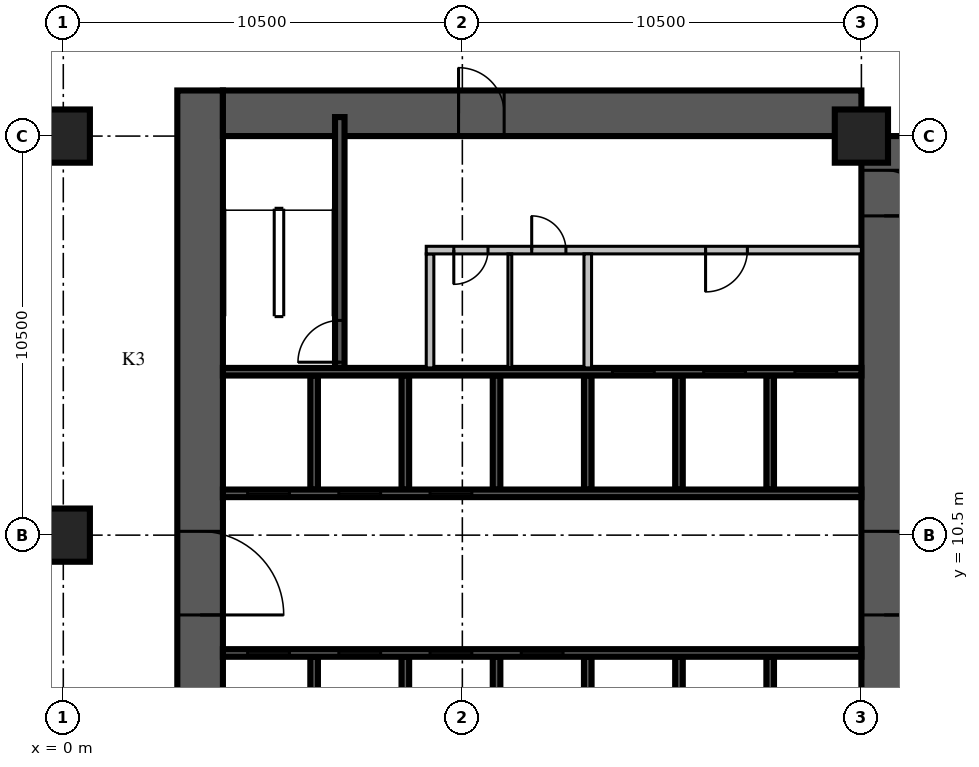
"""IFC4 building model, lengths in metres.
Left out: names, types, materials, properties, quantities, classifications, styles, units other than length and angle.
Written with IfcOpenShell. Run it as: python <this file> out.ifc"""

import sys

from ifc_helpers import new_model, si_unit, direction, frame, frame_2d, origin, origin_2d, place, context, subcontext, project, spatial, rectangle, extrude, source, transform, mapped, element, fill, save


model = new_model("IFC4")
c1 = context("Model", 3, precision=1e-05, world=origin(), true_north=direction((0.0, 1.0)))
c2 = subcontext(c1, "Body", "Model", "MODEL_VIEW")
j1 = project(units=[si_unit("LENGTHUNIT", "METRE"), si_unit("PLANEANGLEUNIT", "RADIAN")], contexts=[c1])
p1 = place(None, origin())
s1 = spatial("IfcSite", under=j1, at=p1, CompositionType="ELEMENT")
p2 = place(p1, origin())
s2 = spatial("IfcBuilding", under=s1, at=p2, CompositionType="ELEMENT")
p3 = place(p2, frame((0.0, 0.0, -13.5)))
s3 = spatial("IfcBuildingStorey", under=s2, at=p3, CompositionType="ELEMENT", Elevation=-13.5)
m1 = source(origin(), c2, "Body", "SweptSolid", [
    extrude(rectangle(XDim=1.4, YDim=1.4, at=origin_2d()), origin(), (0.0, 0.0, 1.0), 4.5),
])
for number, where, z_axis, x_axis in (
    (1, (0.0, 10.5, 0.0), (0.0, 0.0, 1.0), (1.0, 0.0, 0.0)),
    (2, (0.0, 21.0, 0.0), (0.0, 0.0, 1.0), (1.0, 0.0, 0.0)),
    (3, (21.0, 21.0, 0.0), (0.0, 0.0, 1.0), (1.0, 0.0, 0.0)),
):
    element("IfcColumn", number, at=place(p3, frame(where, z_axis=z_axis, x_axis=x_axis)), inside=s3, PredefinedType="COLUMN", context=c2, shape_type="MappedRepresentation", body=[
        mapped(m1, transform((0.0, 0.0, 0.0), scale=1.0)),
    ])
p4 = place(p3, frame((3.6, 4.2, 0.0), z_axis=(0.0, 0.0, 1.0), x_axis=(0.0, 1.0, 0.0)))
e4 = element("IfcWall", 4, at=p4, inside=s3, PredefinedType="SHEAR", context=c2, shape_type="SweptSolid", body=[
    extrude(rectangle(XDim=18.0, YDim=1.2, at=frame_2d((9.0, 0.0))), origin(), (0.0, 0.0, 1.0), 4.5),
])
m2 = source(origin(), c2, "Body", "SweptSolid", [
    extrude(rectangle(XDim=2.2, YDim=2.1, at=frame_2d((1.1, 1.05))), frame((0.0, 0.61, 0.0), z_axis=(0.0, -1.0, 0.0), x_axis=(1.0, 0.0, 0.0)), (0.0, 0.0, 1.0), 1.22),
])
p5 = place(p4, frame((4.2, 0.0, 0.0)))
e5 = element("IfcOpeningElement", 5, at=p5, cuts=e4, PredefinedType="OPENING", context=c2, shape_type="MappedRepresentation", body=[
    mapped(m2, transform((0.0, 0.0, 0.0), scale=1.0)),
])
p6 = place(p3, frame((21.6, 4.2, 0.0), z_axis=(0.0, 0.0, 1.0), x_axis=(0.0, 1.0, 0.0)))
e6 = element("IfcWall", 6, at=p6, inside=s3, PredefinedType="SHEAR", context=c2, shape_type="SweptSolid", body=[
    extrude(rectangle(XDim=16.8, YDim=1.2, at=frame_2d((8.4, 0.0))), origin(), (0.0, 0.0, 1.0), 4.5),
])
p7 = place(p6, frame((4.2, 0.0, 0.0)))
e7 = element("IfcOpeningElement", 7, at=p7, cuts=e6, PredefinedType="OPENING", context=c2, shape_type="SweptSolid", body=[
    extrude(rectangle(XDim=2.2, YDim=2.1, at=frame_2d((1.1, 1.05))), frame((0.0, 0.61, 0.0), z_axis=(0.0, -1.0, 0.0), x_axis=(1.0, 0.0, 0.0)), (0.0, 0.0, 1.0), 1.22),
])
m3 = source(origin(), c2, "Body", "SweptSolid", [
    extrude(rectangle(XDim=1.2, YDim=2.1, at=frame_2d((0.6, 1.05))), frame((0.0, 0.61, 0.0), z_axis=(0.0, -1.0, 0.0), x_axis=(1.0, 0.0, 0.0)), (0.0, 0.0, 1.0), 1.22),
])
p8 = place(p6, frame((14.7, 0.0, 0.0)))
e8 = element("IfcOpeningElement", 8, at=p8, cuts=e6, PredefinedType="OPENING", context=c2, shape_type="MappedRepresentation", body=[
    mapped(m3, transform((0.0, 0.0, 0.0), scale=1.0)),
])
m4 = source(origin(), c2, "Body", "SweptSolid", [
    extrude(rectangle(XDim=16.8, YDim=1.2, at=frame_2d((8.4, 0.0))), origin(), (0.0, 0.0, 1.0), 4.5),
])
p9 = place(p3, frame((4.2, 21.6, 0.0), z_axis=(0.0, 0.0, 1.0), x_axis=(1.0, 0.0, 0.0)))
e9 = element("IfcWall", 9, at=p9, inside=s3, PredefinedType="SHEAR", context=c2, shape_type="MappedRepresentation", body=[
    mapped(m4, transform((0.0, 0.0, 0.0), scale=1.0)),
])
p10 = place(p9, frame((6.2, 0.0, 0.0)))
e10 = element("IfcOpeningElement", 10, at=p10, cuts=e9, PredefinedType="OPENING", context=c2, shape_type="SweptSolid", body=[
    extrude(rectangle(XDim=1.2, YDim=2.1, at=frame_2d((0.6, 1.05))), frame((0.0, 0.61, 0.0), z_axis=(0.0, -1.0, 0.0), x_axis=(1.0, 0.0, 0.0)), (0.0, 0.0, 1.0), 1.22),
])
p11 = place(p3, frame((6.6, 4.2, 0.0), z_axis=(0.0, 0.0, 1.0), x_axis=(0.0, 1.0, 0.0)))
e11 = element("IfcWall", 11, at=p11, inside=s3, PredefinedType="SOLIDWALL", context=c2, shape_type="SweptSolid", body=[
    extrude(rectangle(XDim=3.1, YDim=0.2, at=frame_2d((1.55, 0.0))), origin(), (0.0, 0.0, 1.0), 4.5),
])
m5 = source(origin(), c2, "Body", "SweptSolid", [
    extrude(rectangle(XDim=3.1, YDim=0.2, at=frame_2d((1.55, 0.0))), origin(), (0.0, 0.0, 1.0), 4.5),
])
for number, where, z_axis, x_axis in (
    (12, (9.0, 4.2, 0.0), (0.0, 0.0, 1.0), (0.0, 1.0, 0.0)),
    (13, (11.4, 4.2, 0.0), (0.0, 0.0, 1.0), (0.0, 1.0, 0.0)),
    (14, (13.8, 4.2, 0.0), (0.0, 0.0, 1.0), (0.0, 1.0, 0.0)),
    (15, (16.2, 4.2, 0.0), (0.0, 0.0, 1.0), (0.0, 1.0, 0.0)),
    (16, (18.6, 4.2, 0.0), (0.0, 0.0, 1.0), (0.0, 1.0, 0.0)),
):
    element("IfcWall", number, at=place(p3, frame(where, z_axis=z_axis, x_axis=x_axis)), inside=s3, PredefinedType="SOLIDWALL", context=c2, shape_type="MappedRepresentation", body=[
        mapped(m5, transform((0.0, 0.0, 0.0), scale=1.0)),
    ])
p12 = place(p3, frame((6.6, 11.7, 0.0), z_axis=(0.0, 0.0, 1.0), x_axis=(0.0, 1.0, 0.0)))
e17 = element("IfcWall", 17, at=p12, inside=s3, PredefinedType="SOLIDWALL", context=c2, shape_type="SweptSolid", body=[
    extrude(rectangle(XDim=3.0, YDim=0.2, at=frame_2d((1.5, 0.0))), origin(), (0.0, 0.0, 1.0), 4.5),
])
m6 = source(origin(), c2, "Body", "SweptSolid", [
    extrude(rectangle(XDim=3.0, YDim=0.2, at=frame_2d((1.5, 0.0))), origin(), (0.0, 0.0, 1.0), 4.5),
])
for number, where, z_axis, x_axis in (
    (18, (9.0, 11.7, 0.0), (0.0, 0.0, 1.0), (0.0, 1.0, 0.0)),
    (19, (11.4, 11.7, 0.0), (0.0, 0.0, 1.0), (0.0, 1.0, 0.0)),
    (20, (13.8, 11.7, 0.0), (0.0, 0.0, 1.0), (0.0, 1.0, 0.0)),
    (21, (16.2, 11.7, 0.0), (0.0, 0.0, 1.0), (0.0, 1.0, 0.0)),
    (22, (18.6, 11.7, 0.0), (0.0, 0.0, 1.0), (0.0, 1.0, 0.0)),
):
    element("IfcWall", number, at=place(p3, frame(where, z_axis=z_axis, x_axis=x_axis)), inside=s3, PredefinedType="SOLIDWALL", context=c2, shape_type="MappedRepresentation", body=[
        mapped(m6, transform((0.0, 0.0, 0.0), scale=1.0)),
    ])
p13 = place(p3, frame((4.2, 7.4, 0.0), z_axis=(0.0, 0.0, 1.0), x_axis=(1.0, 0.0, 0.0)))
e23 = element("IfcWall", 23, at=p13, inside=s3, PredefinedType="SOLIDWALL", context=c2, shape_type="SweptSolid", body=[
    extrude(rectangle(XDim=16.8, YDim=0.2, at=frame_2d((8.4, 0.0))), origin(), (0.0, 0.0, 1.0), 4.5),
])
p14 = place(p13, frame((0.65, 0.0, 0.0)))
e24 = element("IfcOpeningElement", 24, at=p14, cuts=e23, PredefinedType="OPENING", context=c2, shape_type="SweptSolid", body=[
    extrude(rectangle(XDim=1.1, YDim=2.1, at=frame_2d((0.55, 1.05))), frame((0.0, 0.11, 0.0), z_axis=(0.0, -1.0, 0.0), x_axis=(1.0, 0.0, 0.0)), (0.0, 0.0, 1.0), 0.22),
])
m7 = source(origin(), c2, "Body", "SweptSolid", [
    extrude(rectangle(XDim=1.1, YDim=2.1, at=frame_2d((0.55, 1.05))), frame((0.0, 0.11, 0.0), z_axis=(0.0, -1.0, 0.0), x_axis=(1.0, 0.0, 0.0)), (0.0, 0.0, 1.0), 0.22),
])
p15 = place(p13, frame((3.05, 0.0, 0.0)))
e25 = element("IfcOpeningElement", 25, at=p15, cuts=e23, PredefinedType="OPENING", context=c2, shape_type="MappedRepresentation", body=[
    mapped(m7, transform((0.0, 0.0, 0.0), scale=1.0)),
])
p16 = place(p13, frame((5.45, 0.0, 0.0)))
e26 = element("IfcOpeningElement", 26, at=p16, cuts=e23, PredefinedType="OPENING", context=c2, shape_type="MappedRepresentation", body=[
    mapped(m7, transform((0.0, 0.0, 0.0), scale=1.0)),
])
p17 = place(p13, frame((7.85, 0.0, 0.0)))
e27 = element("IfcOpeningElement", 27, at=p17, cuts=e23, PredefinedType="OPENING", context=c2, shape_type="MappedRepresentation", body=[
    mapped(m7, transform((0.0, 0.0, 0.0), scale=1.0)),
])
m8 = source(origin(), c2, "Body", "SweptSolid", [
    extrude(rectangle(XDim=16.8, YDim=0.2, at=frame_2d((8.4, 0.0))), origin(), (0.0, 0.0, 1.0), 4.5),
])
p18 = place(p3, frame((4.2, 11.6, 0.0), z_axis=(0.0, 0.0, 1.0), x_axis=(1.0, 0.0, 0.0)))
e28 = element("IfcWall", 28, at=p18, inside=s3, PredefinedType="SOLIDWALL", context=c2, shape_type="MappedRepresentation", body=[
    mapped(m8, transform((0.0, 0.0, 0.0), scale=1.0)),
])
p19 = place(p18, frame((0.65, 0.0, 0.0)))
e29 = element("IfcOpeningElement", 29, at=p19, cuts=e28, PredefinedType="OPENING", context=c2, shape_type="MappedRepresentation", body=[
    mapped(m7, transform((0.0, 0.0, 0.0), scale=1.0)),
])
p20 = place(p18, frame((3.05, 0.0, 0.0)))
e30 = element("IfcOpeningElement", 30, at=p20, cuts=e28, PredefinedType="OPENING", context=c2, shape_type="MappedRepresentation", body=[
    mapped(m7, transform((0.0, 0.0, 0.0), scale=1.0)),
])
p21 = place(p18, frame((5.45, 0.0, 0.0)))
e31 = element("IfcOpeningElement", 31, at=p21, cuts=e28, PredefinedType="OPENING", context=c2, shape_type="MappedRepresentation", body=[
    mapped(m7, transform((0.0, 0.0, 0.0), scale=1.0)),
])
p22 = place(p3, frame((4.2, 14.8, 0.0), z_axis=(0.0, 0.0, 1.0), x_axis=(1.0, 0.0, 0.0)))
e32 = element("IfcWall", 32, at=p22, inside=s3, PredefinedType="SOLIDWALL", context=c2, shape_type="MappedRepresentation", body=[
    mapped(m8, transform((0.0, 0.0, 0.0), scale=1.0)),
])
p23 = place(p22, frame((10.25, 0.0, 0.0)))
e33 = element("IfcOpeningElement", 33, at=p23, cuts=e32, PredefinedType="OPENING", context=c2, shape_type="MappedRepresentation", body=[
    mapped(m7, transform((0.0, 0.0, 0.0), scale=1.0)),
])
p24 = place(p22, frame((12.65, 0.0, 0.0)))
e34 = element("IfcOpeningElement", 34, at=p24, cuts=e32, PredefinedType="OPENING", context=c2, shape_type="MappedRepresentation", body=[
    mapped(m7, transform((0.0, 0.0, 0.0), scale=1.0)),
])
p25 = place(p22, frame((15.05, 0.0, 0.0)))
e35 = element("IfcOpeningElement", 35, at=p25, cuts=e32, PredefinedType="OPENING", context=c2, shape_type="MappedRepresentation", body=[
    mapped(m7, transform((0.0, 0.0, 0.0), scale=1.0)),
])
p26 = place(p3, frame((7.275, 14.9, 0.0), z_axis=(0.0, 0.0, 1.0), x_axis=(0.0, 1.0, 0.0)))
e36 = element("IfcWall", 36, at=p26, inside=s3, PredefinedType="SOLIDWALL", context=c2, shape_type="SweptSolid", body=[
    extrude(rectangle(XDim=6.6, YDim=0.25, at=frame_2d((3.3, 0.0))), origin(), (0.0, 0.0, 1.0), 3.9),
])
p27 = place(p26, frame((0.15, 0.0, 0.0)))
e37 = element("IfcOpeningElement", 37, at=p27, cuts=e36, PredefinedType="OPENING", context=c2, shape_type="SweptSolid", body=[
    extrude(rectangle(XDim=1.1, YDim=2.1, at=frame_2d((0.55, 1.05))), frame((0.0, 0.135, 0.0), z_axis=(0.0, -1.0, 0.0), x_axis=(1.0, 0.0, 0.0)), (0.0, 0.0, 1.0), 0.27),
])
p28 = place(p3, frame((9.65, 14.9, 0.0), z_axis=(0.0, 0.0, 1.0), x_axis=(0.0, 1.0, 0.0)))
e38 = element("IfcWall", 38, at=p28, inside=s3, PredefinedType="PARTITIONING", context=c2, shape_type="SweptSolid", body=[
    extrude(rectangle(XDim=3.0, YDim=0.2, at=frame_2d((1.5, 0.0))), origin(), (0.0, 0.0, 1.0), 3.9),
])
p29 = place(p3, frame((9.55, 18.0, 0.0), z_axis=(0.0, 0.0, 1.0), x_axis=(1.0, 0.0, 0.0)))
e39 = element("IfcWall", 39, at=p29, inside=s3, PredefinedType="PARTITIONING", context=c2, shape_type="SweptSolid", body=[
    extrude(rectangle(XDim=11.45, YDim=0.2, at=frame_2d((5.725, 0.0))), origin(), (0.0, 0.0, 1.0), 3.9),
])
p30 = place(p29, frame((0.725, 0.0, 0.0)))
e40 = element("IfcOpeningElement", 40, at=p30, cuts=e39, PredefinedType="OPENING", context=c2, shape_type="SweptSolid", body=[
    extrude(rectangle(XDim=0.9, YDim=2.1, at=frame_2d((0.45, 1.05))), frame((0.0, 0.11, 0.0), z_axis=(0.0, -1.0, 0.0), x_axis=(1.0, 0.0, 0.0)), (0.0, 0.0, 1.0), 0.22),
])
m9 = source(origin(), c2, "Body", "SweptSolid", [
    extrude(rectangle(XDim=0.9, YDim=2.1, at=frame_2d((0.45, 1.05))), frame((0.0, 0.11, 0.0), z_axis=(0.0, -1.0, 0.0), x_axis=(1.0, 0.0, 0.0)), (0.0, 0.0, 1.0), 0.22),
])
p31 = place(p29, frame((2.775, 0.0, 0.0)))
e41 = element("IfcOpeningElement", 41, at=p31, cuts=e39, PredefinedType="OPENING", context=c2, shape_type="MappedRepresentation", body=[
    mapped(m9, transform((0.0, 0.0, 0.0), scale=1.0)),
])
p32 = place(p29, frame((7.35, 0.0, 0.0)))
e42 = element("IfcOpeningElement", 42, at=p32, cuts=e39, PredefinedType="OPENING", context=c2, shape_type="MappedRepresentation", body=[
    mapped(m7, transform((0.0, 0.0, 0.0), scale=1.0)),
])
m10 = source(origin(), c2, "Body", "SweptSolid", [
    extrude(rectangle(XDim=3.0, YDim=0.2, at=frame_2d((1.5, 0.0))), origin(), (0.0, 0.0, 1.0), 3.9),
])
p33 = place(p3, frame((13.8, 14.9, 0.0), z_axis=(0.0, 0.0, 1.0), x_axis=(0.0, 1.0, 0.0)))
e43 = element("IfcWall", 43, at=p33, inside=s3, PredefinedType="PARTITIONING", context=c2, shape_type="MappedRepresentation", body=[
    mapped(m10, transform((0.0, 0.0, 0.0), scale=1.0)),
])
p34 = place(p3, frame((11.75, 14.9, 0.0), z_axis=(0.0, 0.0, 1.0), x_axis=(0.0, 1.0, 0.0)))
e44 = element("IfcWall", 44, at=p34, inside=s3, PredefinedType="PARTITIONING", context=c2, shape_type="SweptSolid", body=[
    extrude(rectangle(XDim=3.0, YDim=0.1, at=frame_2d((1.5, 0.0))), origin(), (0.0, 0.0, 1.0), 3.9),
])
p35 = place(p14, origin())
e45 = element("IfcDoor", 45, at=p35, inside=s3, OperationType="SLIDING_TO_LEFT", PredefinedType="DOOR", context=c2, shape_type="SweptSolid", body=[
    extrude(rectangle(XDim=1.1, YDim=2.1, at=frame_2d((0.55, 1.05))), frame((0.0, 0.025, 0.0), z_axis=(0.0, -1.0, 0.0), x_axis=(1.0, 0.0, 0.0)), (0.0, 0.0, 1.0), 0.05),
])
fill(e24, e45)
m11 = source(origin(), c2, "Body", "SweptSolid", [
    extrude(rectangle(XDim=1.1, YDim=2.1, at=frame_2d((0.55, 1.05))), frame((0.0, 0.025, 0.0), z_axis=(0.0, -1.0, 0.0), x_axis=(1.0, 0.0, 0.0)), (0.0, 0.0, 1.0), 0.05),
])
p36 = place(p15, origin())
e46 = element("IfcDoor", 46, at=p36, inside=s3, OperationType="SLIDING_TO_LEFT", PredefinedType="DOOR", context=c2, shape_type="MappedRepresentation", body=[
    mapped(m11, transform((0.0, 0.0, 0.0), scale=1.0)),
])
fill(e25, e46)
p37 = place(p16, origin())
e47 = element("IfcDoor", 47, at=p37, inside=s3, OperationType="SLIDING_TO_LEFT", PredefinedType="DOOR", context=c2, shape_type="MappedRepresentation", body=[
    mapped(m11, transform((0.0, 0.0, 0.0), scale=1.0)),
])
fill(e26, e47)
p38 = place(p17, origin())
e48 = element("IfcDoor", 48, at=p38, inside=s3, OperationType="SLIDING_TO_LEFT", PredefinedType="DOOR", context=c2, shape_type="MappedRepresentation", body=[
    mapped(m11, transform((0.0, 0.0, 0.0), scale=1.0)),
])
fill(e27, e48)
p39 = place(p19, origin())
e49 = element("IfcDoor", 49, at=p39, inside=s3, OperationType="SLIDING_TO_LEFT", PredefinedType="DOOR", context=c2, shape_type="MappedRepresentation", body=[
    mapped(m11, transform((0.0, 0.0, 0.0), scale=1.0)),
])
fill(e29, e49)
p40 = place(p20, origin())
e50 = element("IfcDoor", 50, at=p40, inside=s3, OperationType="SLIDING_TO_LEFT", PredefinedType="DOOR", context=c2, shape_type="MappedRepresentation", body=[
    mapped(m11, transform((0.0, 0.0, 0.0), scale=1.0)),
])
fill(e30, e50)
p41 = place(p21, origin())
e51 = element("IfcDoor", 51, at=p41, inside=s3, OperationType="SLIDING_TO_LEFT", PredefinedType="DOOR", context=c2, shape_type="MappedRepresentation", body=[
    mapped(m11, transform((0.0, 0.0, 0.0), scale=1.0)),
])
fill(e31, e51)
p42 = place(p23, origin())
e52 = element("IfcDoor", 52, at=p42, inside=s3, OperationType="SLIDING_TO_LEFT", PredefinedType="DOOR", context=c2, shape_type="MappedRepresentation", body=[
    mapped(m11, transform((0.0, 0.0, 0.0), scale=1.0)),
])
fill(e33, e52)
p43 = place(p24, origin())
e53 = element("IfcDoor", 53, at=p43, inside=s3, OperationType="SLIDING_TO_LEFT", PredefinedType="DOOR", context=c2, shape_type="MappedRepresentation", body=[
    mapped(m11, transform((0.0, 0.0, 0.0), scale=1.0)),
])
fill(e34, e53)
p44 = place(p25, origin())
e54 = element("IfcDoor", 54, at=p44, inside=s3, OperationType="SLIDING_TO_LEFT", PredefinedType="DOOR", context=c2, shape_type="MappedRepresentation", body=[
    mapped(m11, transform((0.0, 0.0, 0.0), scale=1.0)),
])
fill(e35, e54)
p45 = place(p27, origin())
e55 = element("IfcDoor", 55, at=p45, inside=s3, OperationType="SINGLE_SWING_LEFT", PredefinedType="DOOR", context=c2, shape_type="MappedRepresentation", body=[
    mapped(m11, transform((0.0, 0.0, 0.0), scale=1.0)),
])
fill(e37, e55)
m12 = source(origin(), c2, "Body", "SweptSolid", [
    extrude(rectangle(XDim=0.9, YDim=2.1, at=frame_2d((0.45, 1.05))), frame((0.0, 0.025, 0.0), z_axis=(0.0, -1.0, 0.0), x_axis=(1.0, 0.0, 0.0)), (0.0, 0.0, 1.0), 0.05),
])
p46 = place(p30, origin())
e56 = element("IfcDoor", 56, at=p46, inside=s3, OperationType="SINGLE_SWING_RIGHT", PredefinedType="DOOR", context=c2, shape_type="MappedRepresentation", body=[
    mapped(m12, transform((0.0, 0.0, 0.0), scale=1.0)),
])
fill(e40, e56)
p47 = place(p31, origin())
e57 = element("IfcDoor", 57, at=p47, inside=s3, OperationType="SINGLE_SWING_LEFT", PredefinedType="DOOR", context=c2, shape_type="MappedRepresentation", body=[
    mapped(m12, transform((0.0, 0.0, 0.0), scale=1.0)),
])
fill(e41, e57)
p48 = place(p32, origin())
e58 = element("IfcDoor", 58, at=p48, inside=s3, OperationType="SINGLE_SWING_RIGHT", PredefinedType="DOOR", context=c2, shape_type="MappedRepresentation", body=[
    mapped(m11, transform((0.0, 0.0, 0.0), scale=1.0)),
])
fill(e42, e58)
p49 = place(p7, origin())
e59 = element("IfcDoor", 59, at=p49, inside=s3, OperationType="DOUBLE_DOOR_SINGLE_SWING", PredefinedType="DOOR", context=c2, shape_type="SweptSolid", body=[
    extrude(rectangle(XDim=2.2, YDim=2.1, at=frame_2d((1.1, 1.05))), frame((0.0, 0.025, 0.0), z_axis=(0.0, -1.0, 0.0), x_axis=(1.0, 0.0, 0.0)), (0.0, 0.0, 1.0), 0.05),
])
fill(e7, e59)
m13 = source(origin(), c2, "Body", "SweptSolid", [
    extrude(rectangle(XDim=2.2, YDim=2.1, at=frame_2d((1.1, 1.05))), frame((0.0, 0.025, 0.0), z_axis=(0.0, -1.0, 0.0), x_axis=(1.0, 0.0, 0.0)), (0.0, 0.0, 1.0), 0.05),
])
p50 = place(p5, origin())
e60 = element("IfcDoor", 60, at=p50, inside=s3, OperationType="DOUBLE_DOOR_SINGLE_SWING", PredefinedType="DOOR", context=c2, shape_type="MappedRepresentation", body=[
    mapped(m13, transform((0.0, 0.0, 0.0), scale=1.0)),
])
fill(e5, e60)
m14 = source(origin(), c2, "Body", "SweptSolid", [
    extrude(rectangle(XDim=1.2, YDim=2.1, at=frame_2d((0.6, 1.05))), frame((0.0, 0.025, 0.0), z_axis=(0.0, -1.0, 0.0), x_axis=(1.0, 0.0, 0.0)), (0.0, 0.0, 1.0), 0.05),
])
p51 = place(p10, origin())
e61 = element("IfcDoor", 61, at=p51, inside=s3, OperationType="SINGLE_SWING_LEFT", PredefinedType="DOOR", context=c2, shape_type="MappedRepresentation", body=[
    mapped(m14, transform((0.0, 0.0, 0.0), scale=1.0)),
])
fill(e10, e61)
p52 = place(p8, origin())
e62 = element("IfcDoor", 62, at=p52, inside=s3, OperationType="SINGLE_SWING_RIGHT", PredefinedType="DOOR", context=c2, shape_type="MappedRepresentation", body=[
    mapped(m14, transform((0.0, 0.0, 0.0), scale=1.0)),
])
fill(e8, e62)
save(model, sys.argv[1])
